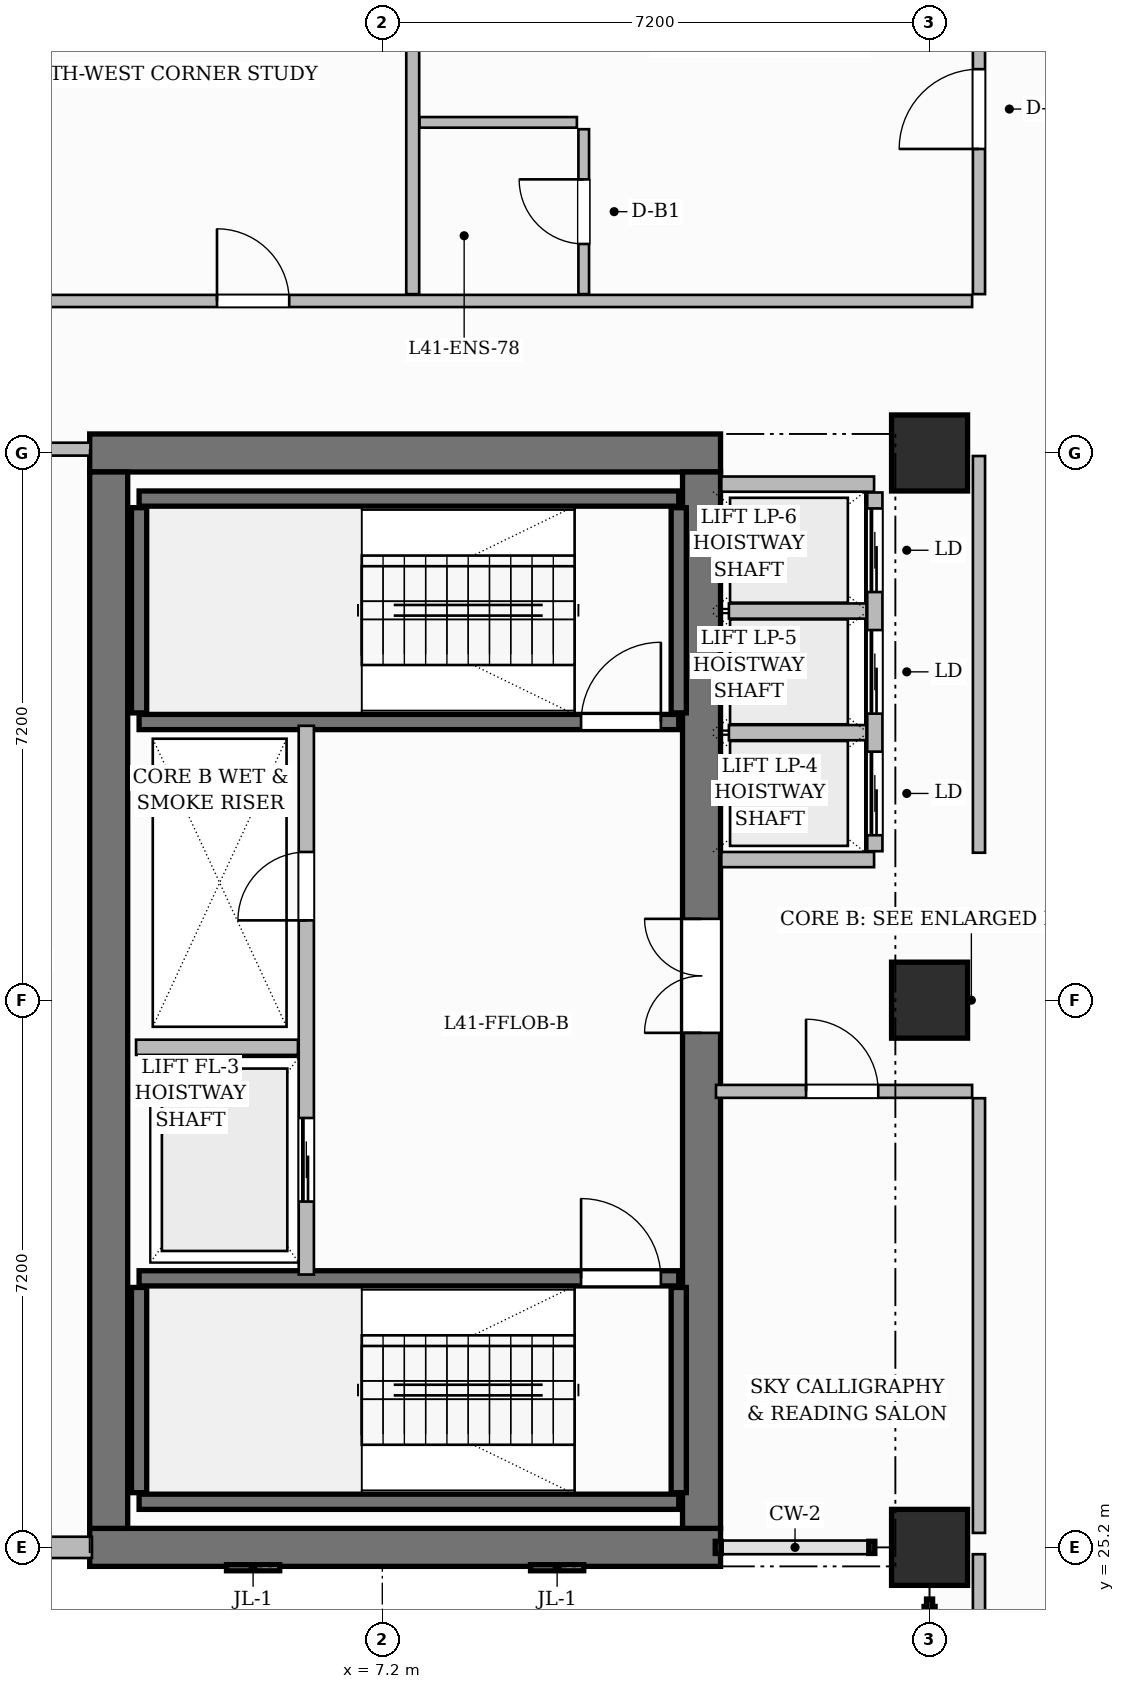
"""IFC4 building model, lengths in metres.
Left out: names, types, materials, properties, quantities, classifications, styles, units other than length and angle.
Written with IfcOpenShell. Run it as: python <this file> out.ifc"""

import sys

from ifc_helpers import new_model, si_unit, direction, frame, frame_2d, origin, origin_2d, place, context, subcontext, project, spatial, rectangle, extrude, source, transform, mapped, element, fill, save


model = new_model("IFC4")
c1 = context("Model", 3, precision=1e-05, world=origin(), true_north=direction((0.0, 1.0)))
c2 = subcontext(c1, "Body", "Model", "MODEL_VIEW")
j1 = project(units=[si_unit("LENGTHUNIT", "METRE"), si_unit("PLANEANGLEUNIT", "RADIAN")], contexts=[c1])
p1 = place(None, origin())
s1 = spatial("IfcSite", under=j1, at=p1, CompositionType="ELEMENT")
p2 = place(p1, origin())
s2 = spatial("IfcBuilding", under=s1, at=p2, CompositionType="ELEMENT")
p3 = place(p2, frame((0.0, 0.0, 165.7)))
s3 = spatial("IfcBuildingStorey", under=s2, at=p3, CompositionType="ELEMENT", Elevation=165.7)
for number, where, z_axis, x_axis in (
    (1, (3.35, 25.2, 0.0), (0.0, 0.0, 1.0), (1.0, 0.0, 0.0)),
    (2, (3.35, 39.6, 0.0), (0.0, 0.0, 1.0), (1.0, 0.0, 0.0)),
):
    element("IfcWall", number, at=place(p3, frame(where, z_axis=z_axis, x_axis=x_axis)), inside=s3, PredefinedType="SHEAR", context=c2, shape_type="SweptSolid", body=[
        extrude(rectangle(XDim=8.3, YDim=0.5, at=frame_2d((4.15, 0.0))), origin(), (0.0, 0.0, 1.0), 3.85),
    ])
p4 = place(p3, frame((3.6, 25.45, 0.0), z_axis=(0.0, 0.0, 1.0), x_axis=(0.0, 1.0, 0.0)))
e3 = element("IfcWall", 3, at=p4, inside=s3, PredefinedType="SHEAR", context=c2, shape_type="SweptSolid", body=[
    extrude(rectangle(XDim=13.9, YDim=0.5, at=frame_2d((6.95, 0.0))), origin(), (0.0, 0.0, 1.0), 3.85),
])
p5 = place(p3, frame((11.4, 25.45, 0.0), z_axis=(0.0, 0.0, 1.0), x_axis=(0.0, 1.0, 0.0)))
e4 = element("IfcWall", 4, at=p5, inside=s3, PredefinedType="SHEAR", context=c2, shape_type="SweptSolid", body=[
    extrude(rectangle(XDim=13.9, YDim=0.5, at=frame_2d((6.95, 0.0))), origin(), (0.0, 0.0, 1.0), 3.85),
])
p6 = place(p5, frame((6.52, 0.0, 0.0)))
e5 = element("IfcOpeningElement", 5, at=p6, cuts=e4, PredefinedType="OPENING", context=c2, shape_type="SweptSolid", body=[
    extrude(rectangle(XDim=1.5, YDim=2.2, at=frame_2d((0.75, 1.1))), frame((0.0, 0.26, 0.0), z_axis=(0.0, -1.0, 0.0), x_axis=(1.0, 0.0, 0.0)), (0.0, 0.0, 1.0), 0.52),
])
m1 = source(origin(), c2, "Body", "SweptSolid", [
    extrude(rectangle(XDim=1.0, YDim=1.0, at=origin_2d()), origin(), (0.0, 0.0, 1.0), 3.85),
])
for number, where, z_axis, x_axis in (
    (6, (14.4, 25.2, 0.0), (0.0, 0.0, 1.0), (1.0, 0.0, 0.0)),
    (7, (14.4, 32.4, 0.0), (0.0, 0.0, 1.0), (1.0, 0.0, 0.0)),
    (8, (14.4, 39.6, 0.0), (0.0, 0.0, 1.0), (1.0, 0.0, 0.0)),
):
    element("IfcColumn", number, at=place(p3, frame(where, z_axis=z_axis, x_axis=x_axis)), inside=s3, PredefinedType="COLUMN", context=c2, shape_type="MappedRepresentation", body=[
        mapped(m1, transform((0.0, 0.0, 0.0), scale=1.0)),
    ])
p7 = place(p3, frame((4.0, 25.8, 0.0), z_axis=(0.0, 0.0, 1.0), x_axis=(1.0, 0.0, 0.0)))
e9 = element("IfcWall", 9, at=p7, inside=s3, PredefinedType="SHEAR", context=c2, shape_type="SweptSolid", body=[
    extrude(rectangle(XDim=7.1, YDim=0.2, at=frame_2d((3.55, 0.0))), origin(), (0.0, 0.0, 1.0), 3.85),
])
for number, where, z_axis, x_axis in (
    (10, (4.0, 25.92, 0.0), (0.0, 0.0, 1.0), (0.0, 1.0, 0.0)),
    (11, (11.1, 25.92, 0.0), (0.0, 0.0, 1.0), (0.0, 1.0, 0.0)),
):
    element("IfcWall", number, at=place(p3, frame(where, z_axis=z_axis, x_axis=x_axis)), inside=s3, PredefinedType="SHEAR", context=c2, shape_type="SweptSolid", body=[
        extrude(rectangle(XDim=2.7, YDim=0.2, at=frame_2d((1.35, 0.0))), origin(), (0.0, 0.0, 1.0), 3.85),
    ])
p8 = place(p3, frame((4.0, 28.74, 0.0), z_axis=(0.0, 0.0, 1.0), x_axis=(1.0, 0.0, 0.0)))
e12 = element("IfcWall", 12, at=p8, inside=s3, PredefinedType="SHEAR", context=c2, shape_type="SweptSolid", body=[
    extrude(rectangle(XDim=7.1, YDim=0.2, at=frame_2d((3.55, 0.0))), origin(), (0.0, 0.0, 1.0), 3.85),
])
p9 = place(p8, frame((5.815, 0.0, 0.0)))
e13 = element("IfcOpeningElement", 13, at=p9, cuts=e12, PredefinedType="OPENING", context=c2, shape_type="SweptSolid", body=[
    extrude(rectangle(XDim=1.05, YDim=2.2, at=frame_2d((0.525, 1.1))), frame((0.0, 0.11, 0.0), z_axis=(0.0, -1.0, 0.0), x_axis=(1.0, 0.0, 0.0)), (0.0, 0.0, 1.0), 0.22),
])
p10 = place(p3, frame((4.0, 39.0, 0.0), z_axis=(0.0, 0.0, 1.0), x_axis=(1.0, 0.0, 0.0)))
e14 = element("IfcWall", 14, at=p10, inside=s3, PredefinedType="SHEAR", context=c2, shape_type="SweptSolid", body=[
    extrude(rectangle(XDim=7.1, YDim=0.2, at=frame_2d((3.55, 0.0))), origin(), (0.0, 0.0, 1.0), 3.85),
])
for number, where, z_axis, x_axis in (
    (15, (4.0, 36.18, 0.0), (0.0, 0.0, 1.0), (0.0, 1.0, 0.0)),
    (16, (11.1, 36.18, 0.0), (0.0, 0.0, 1.0), (0.0, 1.0, 0.0)),
):
    element("IfcWall", number, at=place(p3, frame(where, z_axis=z_axis, x_axis=x_axis)), inside=s3, PredefinedType="SHEAR", context=c2, shape_type="SweptSolid", body=[
        extrude(rectangle(XDim=2.7, YDim=0.2, at=frame_2d((1.35, 0.0))), origin(), (0.0, 0.0, 1.0), 3.85),
    ])
p11 = place(p3, frame((4.0, 36.06, 0.0), z_axis=(0.0, 0.0, 1.0), x_axis=(1.0, 0.0, 0.0)))
e17 = element("IfcWall", 17, at=p11, inside=s3, PredefinedType="SHEAR", context=c2, shape_type="SweptSolid", body=[
    extrude(rectangle(XDim=7.1, YDim=0.2, at=frame_2d((3.55, 0.0))), origin(), (0.0, 0.0, 1.0), 3.85),
])
p12 = place(p11, frame((5.815, 0.0, 0.0)))
e18 = element("IfcOpeningElement", 18, at=p12, cuts=e17, PredefinedType="OPENING", context=c2, shape_type="SweptSolid", body=[
    extrude(rectangle(XDim=1.05, YDim=2.2, at=frame_2d((0.525, 1.1))), frame((0.0, 0.11, 0.0), z_axis=(0.0, -1.0, 0.0), x_axis=(1.0, 0.0, 0.0)), (0.0, 0.0, 1.0), 0.22),
])
p13 = place(p3, frame((6.2, 28.79, 0.0), z_axis=(0.0, 0.0, 1.0), x_axis=(0.0, 1.0, 0.0)))
e19 = element("IfcWall", 19, at=p13, inside=s3, PredefinedType="PARTITIONING", context=c2, shape_type="SweptSolid", body=[
    extrude(rectangle(XDim=7.22, YDim=0.2, at=frame_2d((3.61, 0.0))), origin(), (0.0, 0.0, 1.0), 3.6),
])
p14 = place(p13, frame((4.66, 0.0, 0.0)))
e20 = element("IfcOpeningElement", 20, at=p14, cuts=e19, PredefinedType="OPENING", context=c2, shape_type="SweptSolid", body=[
    extrude(rectangle(XDim=0.9, YDim=2.1, at=frame_2d((0.45, 1.05))), frame((0.0, 0.11, 0.0), z_axis=(0.0, -1.0, 0.0), x_axis=(1.0, 0.0, 0.0)), (0.0, 0.0, 1.0), 0.22),
])
p15 = place(p13, frame((0.96, 0.0, 0.0)))
e21 = element("IfcOpeningElement", 21, at=p15, cuts=e19, PredefinedType="OPENING", context=c2, shape_type="SweptSolid", body=[
    extrude(rectangle(XDim=1.1, YDim=2.2, at=frame_2d((0.55, 1.1))), frame((0.0, 0.11, 0.0), z_axis=(0.0, -1.0, 0.0), x_axis=(1.0, 0.0, 0.0)), (0.0, 0.0, 1.0), 0.22),
])
p16 = place(p3, frame((3.96, 31.78, 0.0), z_axis=(0.0, 0.0, 1.0), x_axis=(1.0, 0.0, 0.0)))
e22 = element("IfcWall", 22, at=p16, inside=s3, PredefinedType="PARTITIONING", context=c2, shape_type="SweptSolid", body=[
    extrude(rectangle(XDim=2.13, YDim=0.2, at=frame_2d((1.065, 0.0))), origin(), (0.0, 0.0, 1.0), 3.6),
])
for number, where, z_axis, x_axis in (
    (23, (11.66, 34.25, 0.0), (0.0, 0.0, 1.0), (1.0, 0.0, 0.0)),
    (24, (11.66, 39.19, 0.0), (0.0, 0.0, 1.0), (1.0, 0.0, 0.0)),
):
    element("IfcWall", number, at=place(p3, frame(where, z_axis=z_axis, x_axis=x_axis)), inside=s3, PredefinedType="PARTITIONING", context=c2, shape_type="SweptSolid", body=[
        extrude(rectangle(XDim=2.01, YDim=0.2, at=frame_2d((1.005, 0.0))), origin(), (0.0, 0.0, 1.0), 3.6),
    ])
p17 = place(p3, frame((13.68, 34.36, 0.0), z_axis=(0.0, 0.0, 1.0), x_axis=(0.0, 1.0, 0.0)))
e25 = element("IfcWall", 25, at=p17, inside=s3, PredefinedType="PARTITIONING", context=c2, shape_type="SweptSolid", body=[
    extrude(rectangle(XDim=4.72, YDim=0.2, at=frame_2d((2.36, 0.0))), origin(), (0.0, 0.0, 1.0), 3.6),
])
p18 = place(p17, frame((0.21, 0.0, 0.0)))
e26 = element("IfcOpeningElement", 26, at=p18, cuts=e25, PredefinedType="OPENING", context=c2, shape_type="SweptSolid", body=[
    extrude(rectangle(XDim=1.1, YDim=2.2, at=frame_2d((0.55, 1.1))), frame((0.0, 0.11, 0.0), z_axis=(0.0, -1.0, 0.0), x_axis=(1.0, 0.0, 0.0)), (0.0, 0.0, 1.0), 0.22),
])
p19 = place(p17, frame((1.81, 0.0, 0.0)))
e27 = element("IfcOpeningElement", 27, at=p19, cuts=e25, PredefinedType="OPENING", context=c2, shape_type="SweptSolid", body=[
    extrude(rectangle(XDim=1.1, YDim=2.2, at=frame_2d((0.55, 1.1))), frame((0.0, 0.11, 0.0), z_axis=(0.0, -1.0, 0.0), x_axis=(1.0, 0.0, 0.0)), (0.0, 0.0, 1.0), 0.22),
])
p20 = place(p17, frame((3.41, 0.0, 0.0)))
e28 = element("IfcOpeningElement", 28, at=p20, cuts=e25, PredefinedType="OPENING", context=c2, shape_type="SweptSolid", body=[
    extrude(rectangle(XDim=1.1, YDim=2.2, at=frame_2d((0.55, 1.1))), frame((0.0, 0.11, 0.0), z_axis=(0.0, -1.0, 0.0), x_axis=(1.0, 0.0, 0.0)), (0.0, 0.0, 1.0), 0.22),
])
for number, where, z_axis, x_axis in (
    (29, (11.76, 35.92, 0.0), (0.0, 0.0, 1.0), (1.0, 0.0, 0.0)),
    (30, (11.76, 37.52, 0.0), (0.0, 0.0, 1.0), (1.0, 0.0, 0.0)),
):
    element("IfcWall", number, at=place(p3, frame(where, z_axis=z_axis, x_axis=x_axis)), inside=s3, PredefinedType="PARTITIONING", context=c2, shape_type="SweptSolid", body=[
        extrude(rectangle(XDim=1.81, YDim=0.2, at=frame_2d((0.905, 0.0))), origin(), (0.0, 0.0, 1.0), 3.6),
    ])
p21 = place(p3, frame((15.05, 11.16, 0.0), z_axis=(0.0, 0.0, 1.0), x_axis=(0.0, 1.0, 0.0)))
e31 = element("IfcWall", 31, at=p21, inside=s3, PredefinedType="PARTITIONING", context=c2, shape_type="SweptSolid", body=[
    extrude(rectangle(XDim=13.95, YDim=0.16, at=frame_2d((6.975, 0.0))), origin(), (0.0, 0.0, 1.0), 3.6),
])
p22 = place(p3, frame((0.24, 39.65, 0.0), z_axis=(0.0, 0.0, 1.0), x_axis=(1.0, 0.0, 0.0)))
e32 = element("IfcWall", 32, at=p22, inside=s3, PredefinedType="PARTITIONING", context=c2, shape_type="SweptSolid", body=[
    extrude(rectangle(XDim=3.12, YDim=0.17, at=frame_2d((1.56, 0.0))), origin(), (0.0, 0.0, 1.0), 3.6),
])
p23 = place(p22, frame((1.11, 0.0, 0.0)))
e33 = element("IfcOpeningElement", 33, at=p23, cuts=e32, PredefinedType="OPENING", context=c2, shape_type="SweptSolid", body=[
    extrude(rectangle(XDim=0.9, YDim=2.15, at=frame_2d((0.45, 1.075))), frame((0.0, 0.095, 0.0), z_axis=(0.0, -1.0, 0.0), x_axis=(1.0, 0.0, 0.0)), (0.0, 0.0, 1.0), 0.19),
])
p24 = place(p3, frame((15.05, 34.34, 0.0), z_axis=(0.0, 0.0, 1.0), x_axis=(0.0, 1.0, 0.0)))
e34 = element("IfcWall", 34, at=p24, inside=s3, PredefinedType="PARTITIONING", context=c2, shape_type="SweptSolid", body=[
    extrude(rectangle(XDim=5.22, YDim=0.16, at=frame_2d((2.61, 0.0))), origin(), (0.0, 0.0, 1.0), 3.6),
])
p25 = place(p3, frame((15.05, 41.69, 0.0), z_axis=(0.0, 0.0, 1.0), x_axis=(0.0, 1.0, 0.0)))
e35 = element("IfcWall", 35, at=p25, inside=s3, PredefinedType="PARTITIONING", context=c2, shape_type="SweptSolid", body=[
    extrude(rectangle(XDim=4.962, YDim=0.16, at=frame_2d((2.481, 0.0))), origin(), (0.0, 0.0, 1.0), 3.6),
])
p26 = place(p25, frame((1.91, 0.0, 0.0)))
e36 = element("IfcOpeningElement", 36, at=p26, cuts=e35, PredefinedType="OPENING", context=c2, shape_type="SweptSolid", body=[
    extrude(rectangle(XDim=1.05, YDim=2.25, at=frame_2d((0.525, 1.125))), frame((0.0, 0.09, 0.0), z_axis=(0.0, -1.0, 0.0), x_axis=(1.0, 0.0, 0.0)), (0.0, 0.0, 1.0), 0.18),
])
p27 = place(p3, frame((7.6, 41.69, 0.0), z_axis=(0.0, 0.0, 1.0), x_axis=(0.0, 1.0, 0.0)))
e37 = element("IfcWall", 37, at=p27, inside=s3, PredefinedType="PARTITIONING", context=c2, shape_type="SweptSolid", body=[
    extrude(rectangle(XDim=4.87, YDim=0.17, at=frame_2d((2.435, 0.0))), origin(), (0.0, 0.0, 1.0), 3.6),
])
p28 = place(p3, frame((0.148, 41.6, 0.0), z_axis=(0.0, 0.0, 1.0), x_axis=(1.0, 0.0, 0.0)))
e38 = element("IfcWall", 38, at=p28, inside=s3, PredefinedType="PARTITIONING", context=c2, shape_type="SweptSolid", body=[
    extrude(rectangle(XDim=14.812, YDim=0.16, at=frame_2d((7.406, 0.0))), origin(), (0.0, 0.0, 1.0), 3.085),
])
p29 = place(p28, frame((4.877, 0.0, 0.0)))
e39 = element("IfcOpeningElement", 39, at=p29, cuts=e38, PredefinedType="OPENING", context=c2, shape_type="SweptSolid", body=[
    extrude(rectangle(XDim=0.95, YDim=2.15, at=frame_2d((0.475, 1.075))), frame((0.0, 0.09, 0.0), z_axis=(0.0, -1.0, 0.0), x_axis=(1.0, 0.0, 0.0)), (0.0, 0.0, 1.0), 0.18),
])
p30 = place(p3, frame((7.69, 43.95, 0.0), z_axis=(0.0, 0.0, 1.0), x_axis=(1.0, 0.0, 0.0)))
e40 = element("IfcWall", 40, at=p30, inside=s3, PredefinedType="PARTITIONING", context=c2, shape_type="SweptSolid", body=[
    extrude(rectangle(XDim=2.07, YDim=0.14, at=frame_2d((1.035, 0.0))), origin(), (0.0, 0.0, 1.0), 3.085),
])
p31 = place(p3, frame((9.85, 41.69, 0.0), z_axis=(0.0, 0.0, 1.0), x_axis=(0.0, 1.0, 0.0)))
e41 = element("IfcWall", 41, at=p31, inside=s3, PredefinedType="PARTITIONING", context=c2, shape_type="SweptSolid", body=[
    extrude(rectangle(XDim=2.17, YDim=0.14, at=frame_2d((1.085, 0.0))), origin(), (0.0, 0.0, 1.0), 3.6),
])
p32 = place(p31, frame((0.66, 0.0, 0.0)))
e42 = element("IfcOpeningElement", 42, at=p32, cuts=e41, PredefinedType="OPENING", context=c2, shape_type="SweptSolid", body=[
    extrude(rectangle(XDim=0.85, YDim=2.1, at=frame_2d((0.425, 1.05))), frame((0.0, 0.08, 0.0), z_axis=(0.0, -1.0, 0.0), x_axis=(1.0, 0.0, 0.0)), (0.0, 0.0, 1.0), 0.16),
])
p33 = place(p3, frame((15.05, 25.39, 0.0), z_axis=(0.0, 0.0, 1.0), x_axis=(0.0, 1.0, 0.0)))
e43 = element("IfcWall", 43, at=p33, inside=s3, PredefinedType="PARTITIONING", context=c2, shape_type="SweptSolid", body=[
    extrude(rectangle(XDim=5.72, YDim=0.16, at=frame_2d((2.86, 0.0))), origin(), (0.0, 0.0, 1.0), 3.6),
])
p34 = place(p3, frame((11.59, 31.2, 0.0), z_axis=(0.0, 0.0, 1.0), x_axis=(1.0, 0.0, 0.0)))
e44 = element("IfcWall", 44, at=p34, inside=s3, PredefinedType="PARTITIONING", context=c2, shape_type="SweptSolid", body=[
    extrude(rectangle(XDim=3.37, YDim=0.17, at=frame_2d((1.685, 0.0))), origin(), (0.0, 0.0, 1.0), 3.6),
])
p35 = place(p34, frame((1.185, 0.0, 0.0)))
e45 = element("IfcOpeningElement", 45, at=p35, cuts=e44, PredefinedType="OPENING", context=c2, shape_type="SweptSolid", body=[
    extrude(rectangle(XDim=0.95, YDim=2.15, at=frame_2d((0.475, 1.075))), frame((0.0, 0.095, 0.0), z_axis=(0.0, -1.0, 0.0), x_axis=(1.0, 0.0, 0.0)), (0.0, 0.0, 1.0), 0.19),
])
p36 = place(p3, frame((0.0, 25.2, 0.0), z_axis=(0.0, 0.0, 1.0), x_axis=(1.0, 0.0, 0.0)))
e46 = element("IfcWall", 46, at=p36, inside=s3, PredefinedType="SOLIDWALL", context=c2, shape_type="SweptSolid", body=[
    extrude(rectangle(XDim=3.38, YDim=0.28, at=frame_2d((1.69, 0.0))), origin(), (0.0, 0.0, 1.0), 3.6),
])
p37 = place(p36, frame((1.205, 0.0, 0.8)))
e47 = element("IfcOpeningElement", 47, at=p37, cuts=e46, PredefinedType="OPENING", context=c2, shape_type="SweptSolid", body=[
    extrude(rectangle(XDim=1.4, YDim=1.85, at=frame_2d((0.7, 0.925))), frame((0.0, 0.15, 0.0), z_axis=(0.0, -1.0, 0.0), x_axis=(1.0, 0.0, 0.0)), (0.0, 0.0, 1.0), 0.3),
])
m2 = source(origin(), c2, "Body", "SweptSolid", [
    extrude(rectangle(XDim=1.05, YDim=2.2, at=frame_2d((0.525, 1.1))), frame((0.0, 0.025, 0.0), z_axis=(0.0, -1.0, 0.0), x_axis=(1.0, 0.0, 0.0)), (0.0, 0.0, 1.0), 0.05),
])
p38 = place(p9, origin())
e48 = element("IfcDoor", 48, at=p38, inside=s3, OperationType="SINGLE_SWING_LEFT", PredefinedType="DOOR", context=c2, shape_type="MappedRepresentation", body=[
    mapped(m2, transform((0.0, 0.0, 0.0), scale=1.0)),
])
fill(e13, e48)
p39 = place(p12, origin())
e49 = element("IfcDoor", 49, at=p39, inside=s3, OperationType="SINGLE_SWING_RIGHT", PredefinedType="DOOR", context=c2, shape_type="MappedRepresentation", body=[
    mapped(m2, transform((0.0, 0.0, 0.0), scale=1.0)),
])
fill(e18, e49)
m3 = source(origin(), c2, "Body", "SweptSolid", [
    extrude(rectangle(XDim=0.9, YDim=2.1, at=frame_2d((0.45, 1.05))), frame((0.0, 0.025, 0.0), z_axis=(0.0, -1.0, 0.0), x_axis=(1.0, 0.0, 0.0)), (0.0, 0.0, 1.0), 0.05),
])
p40 = place(p14, origin())
e50 = element("IfcDoor", 50, at=p40, inside=s3, OperationType="SINGLE_SWING_LEFT", PredefinedType="DOOR", context=c2, shape_type="MappedRepresentation", body=[
    mapped(m3, transform((0.0, 0.0, 0.0), scale=1.0)),
])
fill(e20, e50)
m4 = source(origin(), c2, "Body", "SweptSolid", [
    extrude(rectangle(XDim=1.5, YDim=2.2, at=frame_2d((0.75, 1.1))), frame((0.0, 0.025, 0.0), z_axis=(0.0, -1.0, 0.0), x_axis=(1.0, 0.0, 0.0)), (0.0, 0.0, 1.0), 0.05),
])
p41 = place(p6, origin())
e51 = element("IfcDoor", 51, at=p41, inside=s3, OperationType="DOUBLE_DOOR_SINGLE_SWING", PredefinedType="DOOR", context=c2, shape_type="MappedRepresentation", body=[
    mapped(m4, transform((0.0, 0.0, 0.0), scale=1.0)),
])
fill(e5, e51)
m5 = source(origin(), c2, "Body", "SweptSolid", [
    extrude(rectangle(XDim=0.95, YDim=2.15, at=frame_2d((0.475, 1.075))), frame((0.0, 0.025, 0.0), z_axis=(0.0, -1.0, 0.0), x_axis=(1.0, 0.0, 0.0)), (0.0, 0.0, 1.0), 0.05),
])
p42 = place(p29, origin())
e52 = element("IfcDoor", 52, at=p42, inside=s3, OperationType="SINGLE_SWING_LEFT", PredefinedType="DOOR", context=c2, shape_type="MappedRepresentation", body=[
    mapped(m5, transform((0.0, 0.0, 0.0), scale=1.0)),
])
fill(e39, e52)
m6 = source(origin(), c2, "Body", "SweptSolid", [
    extrude(rectangle(XDim=0.85, YDim=2.1, at=frame_2d((0.425, 1.05))), frame((0.0, 0.025, 0.0), z_axis=(0.0, -1.0, 0.0), x_axis=(1.0, 0.0, 0.0)), (0.0, 0.0, 1.0), 0.05),
])
p43 = place(p32, origin())
e53 = element("IfcDoor", 53, at=p43, inside=s3, OperationType="SINGLE_SWING_RIGHT", PredefinedType="DOOR", context=c2, shape_type="MappedRepresentation", body=[
    mapped(m6, transform((0.0, 0.0, 0.0), scale=1.0)),
])
fill(e42, e53)
m7 = source(origin(), c2, "Body", "SweptSolid", [
    extrude(rectangle(XDim=1.05, YDim=2.25, at=frame_2d((0.525, 1.125))), frame((0.0, 0.025, 0.0), z_axis=(0.0, -1.0, 0.0), x_axis=(1.0, 0.0, 0.0)), (0.0, 0.0, 1.0), 0.05),
])
p44 = place(p26, origin())
e54 = element("IfcDoor", 54, at=p44, inside=s3, OperationType="SINGLE_SWING_LEFT", PredefinedType="DOOR", context=c2, shape_type="MappedRepresentation", body=[
    mapped(m7, transform((0.0, 0.0, 0.0), scale=1.0)),
])
fill(e36, e54)
p45 = place(p35, origin())
e55 = element("IfcDoor", 55, at=p45, inside=s3, OperationType="SINGLE_SWING_LEFT", PredefinedType="DOOR", context=c2, shape_type="MappedRepresentation", body=[
    mapped(m5, transform((0.0, 0.0, 0.0), scale=1.0)),
])
fill(e45, e55)
m8 = source(origin(), c2, "Body", "SweptSolid", [
    extrude(rectangle(XDim=1.1, YDim=2.2, at=frame_2d((0.55, 1.1))), frame((0.0, 0.025, 0.0), z_axis=(0.0, -1.0, 0.0), x_axis=(1.0, 0.0, 0.0)), (0.0, 0.0, 1.0), 0.05),
])
p46 = place(p15, origin())
e56 = element("IfcDoor", 56, at=p46, inside=s3, OperationType="SLIDING_TO_LEFT", PredefinedType="DOOR", context=c2, shape_type="MappedRepresentation", body=[
    mapped(m8, transform((0.0, 0.0, 0.0), scale=1.0)),
])
fill(e21, e56)
p47 = place(p18, origin())
e57 = element("IfcDoor", 57, at=p47, inside=s3, OperationType="SLIDING_TO_LEFT", PredefinedType="DOOR", context=c2, shape_type="MappedRepresentation", body=[
    mapped(m8, transform((0.0, 0.0, 0.0), scale=1.0)),
])
fill(e26, e57)
p48 = place(p19, origin())
e58 = element("IfcDoor", 58, at=p48, inside=s3, OperationType="SLIDING_TO_LEFT", PredefinedType="DOOR", context=c2, shape_type="MappedRepresentation", body=[
    mapped(m8, transform((0.0, 0.0, 0.0), scale=1.0)),
])
fill(e27, e58)
p49 = place(p20, origin())
e59 = element("IfcDoor", 59, at=p49, inside=s3, OperationType="SLIDING_TO_LEFT", PredefinedType="DOOR", context=c2, shape_type="MappedRepresentation", body=[
    mapped(m8, transform((0.0, 0.0, 0.0), scale=1.0)),
])
fill(e28, e59)
save(model, sys.argv[1])
